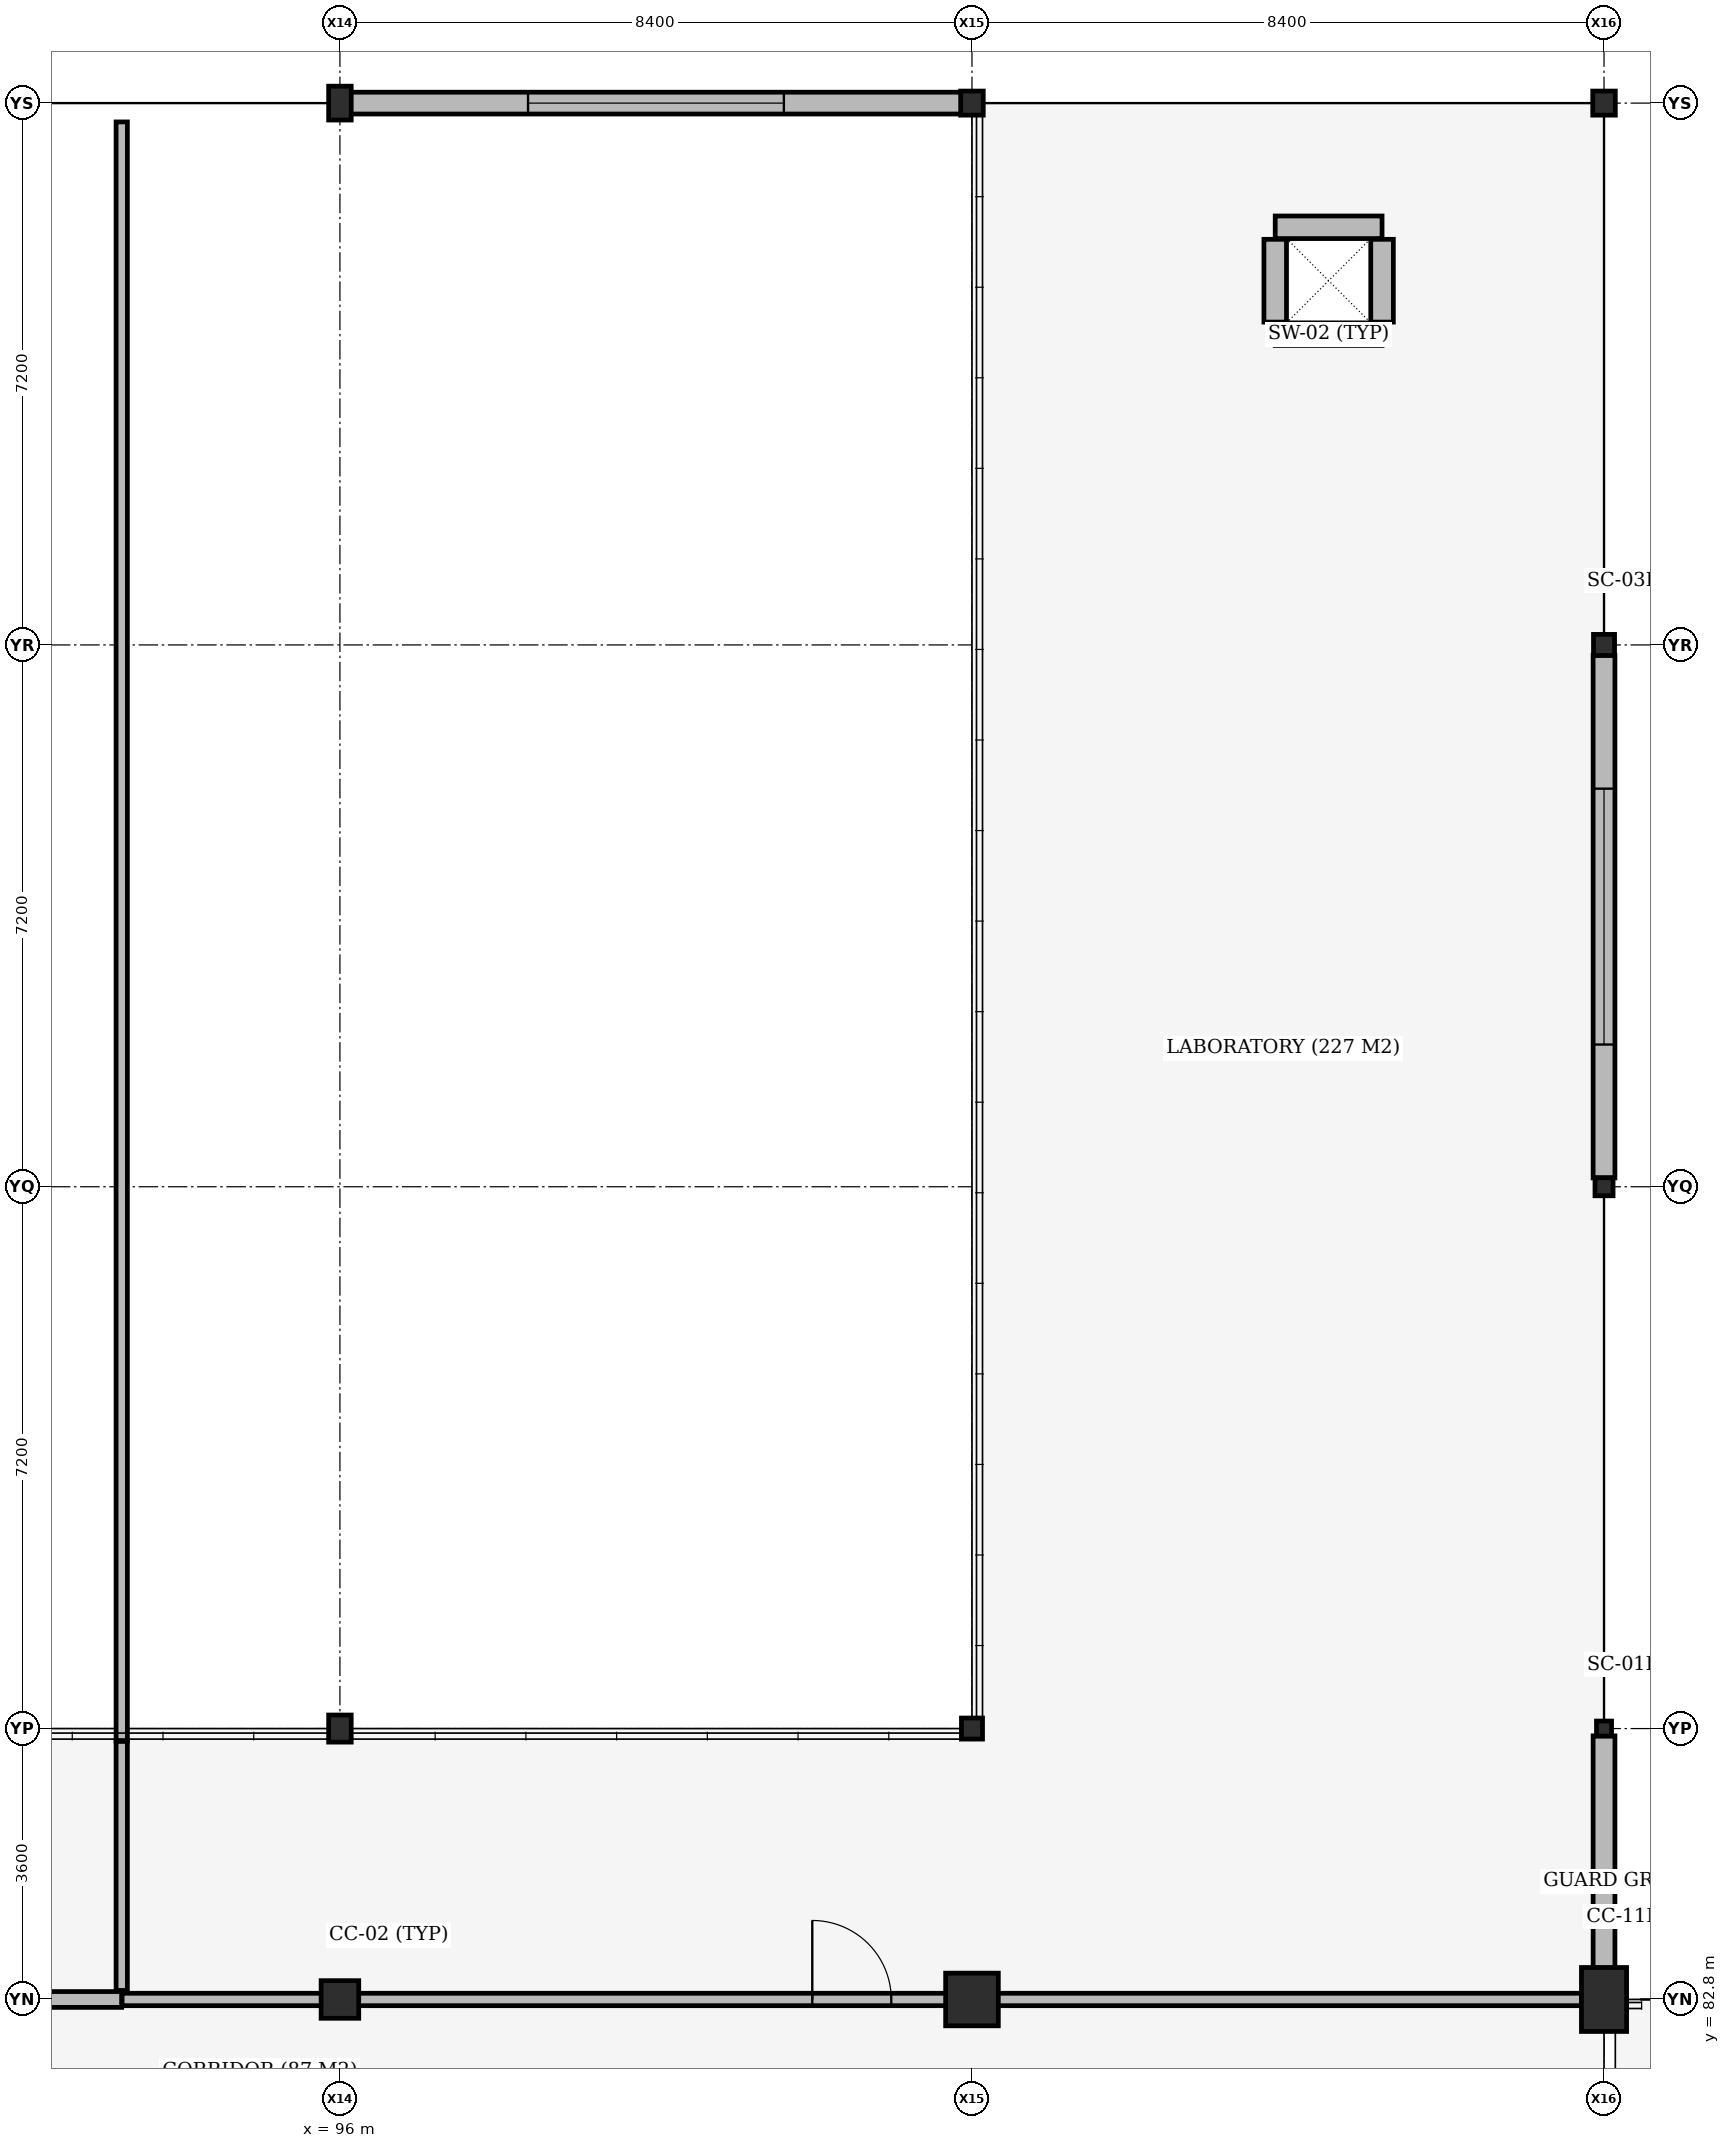
"""IFC4 building model, lengths in metres.
Left out: names, types, materials, properties, quantities, classifications, styles, units other than length and angle.
Written with IfcOpenShell. Run it as: python <this file> out.ifc"""

import sys

from ifc_helpers import new_model, si_unit, direction, frame, frame_2d, origin, origin_2d, place, context, subcontext, project, spatial, rectangle, i_section, extrude, element, fill, save


model = new_model("IFC4")
c1 = context("Model", 3, precision=1e-05, world=origin(), true_north=direction((0.0, 1.0)))
c2 = subcontext(c1, "Body", "Model", "MODEL_VIEW")
j1 = project(units=[si_unit("LENGTHUNIT", "METRE"), si_unit("PLANEANGLEUNIT", "RADIAN")], contexts=[c1])
p1 = place(None, origin())
s1 = spatial("IfcSite", under=j1, at=p1, CompositionType="ELEMENT")
p2 = place(p1, origin())
s2 = spatial("IfcBuilding", under=s1, at=p2, CompositionType="ELEMENT")
p3 = place(p2, frame((0.0, 0.0, 5.4)))
s3 = spatial("IfcBuildingStorey", under=s2, at=p3, CompositionType="ELEMENT", Elevation=5.4)
p4 = place(p3, frame((108.43, 104.93, 0.0), z_axis=(0.0, 0.0, 1.0), x_axis=(1.0, 0.0, 0.0)))
e1 = element("IfcWall", 1, at=p4, inside=s3, PredefinedType="SHEAR", context=c2, shape_type="SweptSolid", body=[
    extrude(rectangle(XDim=1.42, YDim=0.3, at=frame_2d((0.71, 0.0))), origin(), (0.0, 0.0, 1.0), 3.96),
])
p5 = place(p3, frame((109.85, 105.09, 0.0), z_axis=(0.0, 0.0, 1.0), x_axis=(0.0, 1.0, 0.0)))
e2 = element("IfcWall", 2, at=p5, inside=s3, PredefinedType="SHEAR", context=c2, shape_type="SweptSolid", body=[
    extrude(rectangle(XDim=1.1, YDim=0.3, at=frame_2d((0.55, 0.0))), origin(), (0.0, 0.0, 1.0), 3.96),
])
p6 = place(p3, frame((109.85, 106.35, 0.0), z_axis=(0.0, 0.0, 1.0), x_axis=(-1.0, 0.0, 0.0)))
e3 = element("IfcWall", 3, at=p6, inside=s3, PredefinedType="SHEAR", context=c2, shape_type="SweptSolid", body=[
    extrude(rectangle(XDim=1.42, YDim=0.3, at=frame_2d((0.71, 0.0))), origin(), (0.0, 0.0, 1.0), 3.96),
])
p7 = place(p3, frame((108.43, 106.19, 0.0), z_axis=(0.0, 0.0, 1.0), x_axis=(0.0, -1.0, 0.0)))
e4 = element("IfcWall", 4, at=p7, inside=s3, PredefinedType="SHEAR", context=c2, shape_type="SweptSolid", body=[
    extrude(rectangle(XDim=1.1, YDim=0.3, at=frame_2d((0.55, 0.0))), origin(), (0.0, 0.0, 1.0), 3.96),
])
p8 = place(p3, frame((96.0, 82.8, 0.0), z_axis=(0.0, 0.0, 1.0), x_axis=(1.0, 0.0, 0.0)))
e5 = element("IfcColumn", 5, at=p8, inside=s3, PredefinedType="COLUMN", context=c2, shape_type="SweptSolid", body=[
    extrude(rectangle(XDim=0.5, YDim=0.5, at=origin_2d()), origin(), (0.0, 0.0, 1.0), 3.92),
])
p9 = place(p3, frame((96.0, 86.4, 0.0), z_axis=(0.0, 0.0, 1.0), x_axis=(1.0, 0.0, 0.0)))
e6 = element("IfcColumn", 6, at=p9, inside=s3, PredefinedType="COLUMN", context=c2, shape_type="SweptSolid", body=[
    extrude(i_section(OverallWidth=0.3, OverallDepth=0.36, WebThickness=0.012, FlangeThickness=0.022, FilletRadius=0.027, at=origin_2d()), origin(), (0.0, 0.0, 1.0), 3.92),
])
p10 = place(p3, frame((96.0, 108.0, 0.0), z_axis=(0.0, 0.0, 1.0), x_axis=(1.0, 0.0, 0.0)))
e7 = element("IfcColumn", 7, at=p10, inside=s3, PredefinedType="COLUMN", context=c2, shape_type="SweptSolid", body=[
    extrude(i_section(OverallWidth=0.3, OverallDepth=0.45, WebThickness=0.014, FlangeThickness=0.026, FilletRadius=0.027, at=origin_2d()), origin(), (0.0, 0.0, 1.0), 8.18),
])
p11 = place(p3, frame((104.4, 82.8, 0.0), z_axis=(0.0, 0.0, 1.0), x_axis=(1.0, 0.0, 0.0)))
e8 = element("IfcColumn", 8, at=p11, inside=s3, PredefinedType="COLUMN", context=c2, shape_type="SweptSolid", body=[
    extrude(rectangle(XDim=0.7, YDim=0.7, at=origin_2d()), origin(), (0.0, 0.0, 1.0), 3.92),
])
p12 = place(p3, frame((104.4, 86.4, 0.0), z_axis=(0.0, 0.0, 1.0), x_axis=(1.0, 0.0, 0.0)))
e9 = element("IfcColumn", 9, at=p12, inside=s3, PredefinedType="COLUMN", context=c2, shape_type="SweptSolid", body=[
    extrude(i_section(OverallWidth=0.28, OverallDepth=0.28, WebThickness=0.01, FlangeThickness=0.018, FilletRadius=0.024, at=origin_2d()), origin(), (0.0, 0.0, 1.0), 3.92),
])
p13 = place(p3, frame((104.4, 108.0, 0.0), z_axis=(0.0, 0.0, 1.0), x_axis=(1.0, 0.0, 0.0)))
e10 = element("IfcColumn", 10, at=p13, inside=s3, PredefinedType="COLUMN", context=c2, shape_type="SweptSolid", body=[
    extrude(i_section(OverallWidth=0.3, OverallDepth=0.32, WebThickness=0.011, FlangeThickness=0.021, FilletRadius=0.027, at=origin_2d()), origin(), (0.0, 0.0, 1.0), 8.18),
])
p14 = place(p3, frame((112.8, 82.8, 0.0), z_axis=(0.0, 0.0, 1.0), x_axis=(1.0, 0.0, 0.0)))
e11 = element("IfcColumn", 11, at=p14, inside=s3, PredefinedType="COLUMN", context=c2, shape_type="SweptSolid", body=[
    extrude(rectangle(XDim=0.6, YDim=0.85, at=origin_2d()), origin(), (0.0, 0.0, 1.0), 3.92),
])
p15 = place(p3, frame((112.8, 86.4, 0.0), z_axis=(0.0, 0.0, 1.0), x_axis=(1.0, 0.0, 0.0)))
e12 = element("IfcColumn", 12, at=p15, inside=s3, PredefinedType="COLUMN", context=c2, shape_type="SweptSolid", body=[
    extrude(i_section(OverallWidth=0.2, OverallDepth=0.2, WebThickness=0.009, FlangeThickness=0.015, FilletRadius=0.018, at=origin_2d()), origin(), (0.0, 0.0, 1.0), 3.92),
])
p16 = place(p3, frame((112.8, 93.6, 0.0), z_axis=(0.0, 0.0, 1.0), x_axis=(1.0, 0.0, 0.0)))
e13 = element("IfcColumn", 13, at=p16, inside=s3, PredefinedType="COLUMN", context=c2, shape_type="SweptSolid", body=[
    extrude(i_section(OverallWidth=0.24, OverallDepth=0.24, WebThickness=0.01, FlangeThickness=0.017, FilletRadius=0.021, at=origin_2d()), origin(), (0.0, 0.0, 1.0), 8.18),
])
p17 = place(p3, frame((112.8, 100.8, 0.0), z_axis=(0.0, 0.0, 1.0), x_axis=(1.0, 0.0, 0.0)))
e14 = element("IfcColumn", 14, at=p17, inside=s3, PredefinedType="COLUMN", context=c2, shape_type="SweptSolid", body=[
    extrude(i_section(OverallWidth=0.28, OverallDepth=0.28, WebThickness=0.01, FlangeThickness=0.018, FilletRadius=0.024, at=origin_2d()), origin(), (0.0, 0.0, 1.0), 8.18),
])
p18 = place(p3, frame((112.8, 108.0, 0.0), z_axis=(0.0, 0.0, 1.0), x_axis=(1.0, 0.0, 0.0)))
e15 = element("IfcColumn", 15, at=p18, inside=s3, PredefinedType="COLUMN", context=c2, shape_type="SweptSolid", body=[
    extrude(i_section(OverallWidth=0.3, OverallDepth=0.32, WebThickness=0.011, FlangeThickness=0.021, FilletRadius=0.027, at=origin_2d()), origin(), (0.0, 0.0, 1.0), 8.18),
])
p19 = place(p3, frame((96.008, 108.0, 0.0), z_axis=(0.0, 0.0, 1.0), x_axis=(1.0, 0.0, 0.0)))
e16 = element("IfcWall", 16, at=p19, inside=s3, PredefinedType="STANDARD", context=c2, shape_type="SweptSolid", body=[
    extrude(rectangle(XDim=8.384, YDim=0.29, at=frame_2d((4.192, 0.0))), origin(), (0.0, 0.0, 1.0), 3.92),
])
p20 = place(p19, frame((2.492, 0.0, 1.6)))
e17 = element("IfcOpeningElement", 17, at=p20, cuts=e16, PredefinedType="OPENING", context=c2, shape_type="SweptSolid", body=[
    extrude(rectangle(XDim=3.4, YDim=1.5, at=frame_2d((1.7, 0.75))), frame((0.0, 0.155, 0.0), z_axis=(0.0, -1.0, 0.0), x_axis=(1.0, 0.0, 0.0)), (0.0, 0.0, 1.0), 0.31),
])
p21 = place(p3, frame((112.8, 86.303, 0.0), z_axis=(0.0, 0.0, 1.0), x_axis=(0.0, -1.0, 0.0)))
e18 = element("IfcWall", 18, at=p21, inside=s3, PredefinedType="STANDARD", context=c2, shape_type="SweptSolid", body=[
    extrude(rectangle(XDim=3.086, YDim=0.29, at=frame_2d((1.543, 0.0))), origin(), (0.0, 0.0, 1.0), 3.53),
])
p22 = place(p3, frame((112.8, 100.663, 0.0), z_axis=(0.0, 0.0, 1.0), x_axis=(0.0, -1.0, 0.0)))
e19 = element("IfcWall", 19, at=p22, inside=s3, PredefinedType="STANDARD", context=c2, shape_type="SweptSolid", body=[
    extrude(rectangle(XDim=6.946, YDim=0.29, at=frame_2d((3.473, 0.0))), origin(), (0.0, 0.0, 1.0), 3.59),
])
p23 = place(p22, frame((1.773, 0.0, 1.6)))
e20 = element("IfcOpeningElement", 20, at=p23, cuts=e19, PredefinedType="OPENING", context=c2, shape_type="SweptSolid", body=[
    extrude(rectangle(XDim=3.4, YDim=1.5, at=frame_2d((1.7, 0.75))), frame((0.0, 0.155, 0.0), z_axis=(0.0, -1.0, 0.0), x_axis=(1.0, 0.0, 0.0)), (0.0, 0.0, 1.0), 0.31),
])
p24 = place(p3, frame((78.205, 82.8, 0.0), z_axis=(0.0, 0.0, 1.0), x_axis=(1.0, 0.0, 0.0)))
e21 = element("IfcWall", 21, at=p24, inside=s3, PredefinedType="STANDARD", context=c2, shape_type="SweptSolid", body=[
    extrude(rectangle(XDim=14.895, YDim=0.21, at=frame_2d((7.448, 0.0))), origin(), (0.0, 0.0, 1.0), 3.53),
])
p25 = place(p24, frame((6.498, 0.0, 0.0)))
e22 = element("IfcOpeningElement", 22, at=p25, cuts=e21, PredefinedType="OPENING", context=c2, shape_type="SweptSolid", body=[
    extrude(rectangle(XDim=1.9, YDim=2.35, at=frame_2d((0.95, 1.175))), frame((0.0, 0.115, 0.0), z_axis=(0.0, -1.0, 0.0), x_axis=(1.0, 0.0, 0.0)), (0.0, 0.0, 1.0), 0.23),
])
p26 = place(p3, frame((93.1, 82.92, 0.0), z_axis=(0.0, 0.0, 1.0), x_axis=(0.0, 1.0, 0.0)))
e23 = element("IfcWall", 23, at=p26, inside=s3, PredefinedType="PARTITIONING", context=c2, shape_type="SweptSolid", body=[
    extrude(rectangle(XDim=3.31, YDim=0.15, at=frame_2d((1.655, 0.0))), origin(), (0.0, 0.0, 1.0), 3.63),
])
p27 = place(p3, frame((93.105, 82.8, 0.0), z_axis=(0.0, 0.0, 1.0), x_axis=(1.0, 0.0, 0.0)))
e24 = element("IfcWall", 24, at=p27, inside=s3, PredefinedType="PARTITIONING", context=c2, shape_type="SweptSolid", body=[
    extrude(rectangle(XDim=19.395, YDim=0.165, at=frame_2d((9.698, 0.0))), origin(), (0.0, 0.0, 1.0), 3.59),
])
p28 = place(p27, frame((9.173, 0.0, 0.0)))
e25 = element("IfcOpeningElement", 25, at=p28, cuts=e24, PredefinedType="OPENING", context=c2, shape_type="SweptSolid", body=[
    extrude(rectangle(XDim=1.05, YDim=2.2, at=frame_2d((0.525, 1.1))), frame((0.0, 0.093, 0.0), z_axis=(0.0, -1.0, 0.0), x_axis=(1.0, 0.0, 0.0)), (0.0, 0.0, 1.0), 0.185),
])
p29 = place(p3, frame((93.1, 86.235, 0.0), z_axis=(0.0, 0.0, 1.0), x_axis=(0.0, 1.0, 0.0)))
e26 = element("IfcWall", 26, at=p29, inside=s3, PredefinedType="PARTITIONING", context=c2, shape_type="SweptSolid", body=[
    extrude(rectangle(XDim=21.515, YDim=0.15, at=frame_2d((10.757, 0.0))), origin(), (0.0, 0.0, 1.0), 3.125),
])
p30 = place(p20, origin())
e27 = element("IfcWindow", 27, at=p30, inside=s3, PartitioningType="DOUBLE_PANEL_VERTICAL", PredefinedType="WINDOW", context=c2, shape_type="SweptSolid", body=[
    extrude(rectangle(XDim=3.4, YDim=1.5, at=frame_2d((1.7, 0.75))), frame((0.0, 0.03, 0.0), z_axis=(0.0, -1.0, 0.0), x_axis=(1.0, 0.0, 0.0)), (0.0, 0.0, 1.0), 0.06),
])
fill(e17, e27)
p31 = place(p23, origin())
e28 = element("IfcWindow", 28, at=p31, inside=s3, PartitioningType="DOUBLE_PANEL_VERTICAL", PredefinedType="WINDOW", context=c2, shape_type="SweptSolid", body=[
    extrude(rectangle(XDim=3.4, YDim=1.5, at=frame_2d((1.7, 0.75))), frame((0.0, 0.03, 0.0), z_axis=(0.0, -1.0, 0.0), x_axis=(1.0, 0.0, 0.0)), (0.0, 0.0, 1.0), 0.06),
])
fill(e20, e28)
p32 = place(p28, origin())
e29 = element("IfcDoor", 29, at=p32, inside=s3, OperationType="SINGLE_SWING_LEFT", PredefinedType="DOOR", context=c2, shape_type="SweptSolid", body=[
    extrude(rectangle(XDim=1.05, YDim=2.2, at=frame_2d((0.525, 1.1))), frame((0.0, 0.025, 0.0), z_axis=(0.0, -1.0, 0.0), x_axis=(1.0, 0.0, 0.0)), (0.0, 0.0, 1.0), 0.05),
])
fill(e25, e29)
save(model, sys.argv[1])
